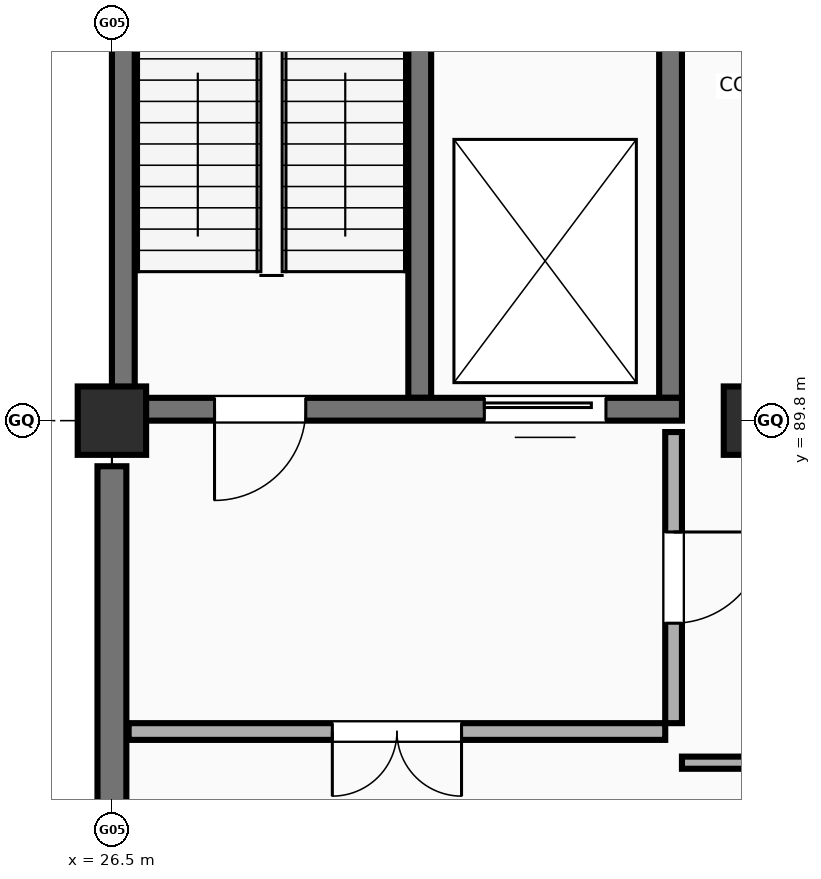
"""IFC4 building model, lengths in metres.
Left out: names, types, materials, properties, quantities, classifications, styles, units other than length and angle.
Written with IfcOpenShell. Run it as: python <this file> out.ifc"""

import sys

from ifc_helpers import new_model, si_unit, direction, frame, frame_2d, origin, origin_2d, place, context, subcontext, project, spatial, rectangle, extrude, element, fill, save


model = new_model("IFC4")
c1 = context("Model", 3, precision=1e-05, world=origin(), true_north=direction((0.0, 1.0)))
c2 = subcontext(c1, "Body", "Model", "MODEL_VIEW")
j1 = project(units=[si_unit("LENGTHUNIT", "METRE"), si_unit("PLANEANGLEUNIT", "RADIAN")], contexts=[c1])
p1 = place(None, origin())
s1 = spatial("IfcSite", under=j1, at=p1, CompositionType="ELEMENT")
p2 = place(p1, origin())
s2 = spatial("IfcBuilding", under=s1, at=p2, CompositionType="ELEMENT")
p3 = place(p2, frame((0.0, 0.0, -4.2)))
s3 = spatial("IfcBuildingStorey", under=s2, at=p3, CompositionType="ELEMENT", Elevation=-4.2)
for number, where, z_axis, x_axis in (
    (1, (26.5, 89.8, -0.42), (0.0, 0.0, 1.0), (1.0, 0.0, 0.0)),
    (2, (35.0, 89.8, -0.42), (0.0, 0.0, 1.0), (1.0, 0.0, 0.0)),
):
    element("IfcColumn", number, at=place(p3, frame(where, z_axis=z_axis, x_axis=x_axis)), inside=s3, PredefinedType="COLUMN", context=c2, shape_type="SweptSolid", body=[
        extrude(rectangle(XDim=0.9, YDim=0.9, at=origin_2d()), origin(), (0.0, 0.0, 1.0), 4.62),
    ])
for number, where, z_axis, x_axis in (
    (3, (26.65, 90.1, -0.42), (0.0, 0.0, 1.0), (0.0, 1.0, 0.0)),
    (4, (33.85, 90.1, -0.42), (0.0, 0.0, 1.0), (0.0, 1.0, 0.0)),
    (5, (30.55, 90.1, -0.42), (0.0, 0.0, 1.0), (0.0, 1.0, 0.0)),
):
    element("IfcWall", number, at=place(p3, frame(where, z_axis=z_axis, x_axis=x_axis)), inside=s3, PredefinedType="SHEAR", context=c2, shape_type="SweptSolid", body=[
        extrude(rectangle(XDim=8.2, YDim=0.3, at=frame_2d((4.1, 0.0))), origin(), (0.0, 0.0, 1.0), 4.62),
    ])
p4 = place(p3, frame((26.5, 73.25, -0.42), z_axis=(0.0, 0.0, 1.0), x_axis=(0.0, 1.0, 0.0)))
e6 = element("IfcWall", 6, at=p4, inside=s3, PredefinedType="SHEAR", context=c2, shape_type="SweptSolid", body=[
    extrude(rectangle(XDim=15.95, YDim=0.38, at=frame_2d((7.975, 0.0))), origin(), (0.0, 0.0, 1.0), 4.3),
])
p5 = place(p3, frame((26.5, 89.95, 0.0), z_axis=(0.0, 0.0, 1.0), x_axis=(1.0, 0.0, 0.0)))
e7 = element("IfcWall", 7, at=p5, inside=s3, PredefinedType="SHEAR", context=c2, shape_type="SweptSolid", body=[
    extrude(rectangle(XDim=7.5, YDim=0.3, at=frame_2d((3.75, 0.0))), origin(), (0.0, 0.0, 1.0), 4.2),
])
p6 = place(p5, frame((2.55, 0.0, 0.0), z_axis=(0.0, 0.0, 1.0), x_axis=(-1.0, 0.0, 0.0)))
e8 = element("IfcOpeningElement", 8, at=p6, cuts=e7, PredefinedType="OPENING", context=c2, shape_type="SweptSolid", body=[
    extrude(rectangle(XDim=1.2, YDim=2.15, at=frame_2d((0.6, 1.075))), frame((0.0, 0.16, 0.0), z_axis=(0.0, -1.0, 0.0), x_axis=(1.0, 0.0, 0.0)), (0.0, 0.0, 1.0), 0.32),
])
p7 = place(p5, frame((4.9, 0.0, 0.0)))
e9 = element("IfcOpeningElement", 9, at=p7, cuts=e7, PredefinedType="OPENING", context=c2, shape_type="SweptSolid", body=[
    extrude(rectangle(XDim=1.6, YDim=2.25, at=frame_2d((0.8, 1.125))), frame((0.0, 0.16, 0.0), z_axis=(0.0, -1.0, 0.0), x_axis=(1.0, 0.0, 0.0)), (0.0, 0.0, 1.0), 0.32),
])
p8 = place(p3, frame((26.72, 85.71, 0.0), z_axis=(0.0, 0.0, 1.0), x_axis=(1.0, 0.0, 0.0)))
e10 = element("IfcWall", 10, at=p8, inside=s3, PredefinedType="SOLIDWALL", context=c2, shape_type="SweptSolid", body=[
    extrude(rectangle(XDim=7.06, YDim=0.22, at=frame_2d((3.53, 0.0))), origin(), (0.0, 0.0, 1.0), 2.96),
])
p9 = place(p8, frame((4.38, 0.0, 0.0), z_axis=(0.0, 0.0, 1.0), x_axis=(-1.0, 0.0, 0.0)))
e11 = element("IfcOpeningElement", 11, at=p9, cuts=e10, PredefinedType="OPENING", context=c2, shape_type="SweptSolid", body=[
    extrude(rectangle(XDim=1.7, YDim=2.18, at=frame_2d((0.85, 1.09))), frame((0.0, 0.12, 0.0), z_axis=(0.0, -1.0, 0.0), x_axis=(1.0, 0.0, 0.0)), (0.0, 0.0, 1.0), 0.24),
])
p10 = place(p3, frame((33.89, 85.82, 0.0), z_axis=(0.0, 0.0, 1.0), x_axis=(0.0, 1.0, 0.0)))
e12 = element("IfcWall", 12, at=p10, inside=s3, PredefinedType="SOLIDWALL", context=c2, shape_type="SweptSolid", body=[
    extrude(rectangle(XDim=3.83, YDim=0.22, at=frame_2d((1.915, 0.0))), origin(), (0.0, 0.0, 1.0), 2.96),
])
p11 = place(p10, frame((2.515, 0.0, 0.0), z_axis=(0.0, 0.0, 1.0), x_axis=(-1.0, 0.0, 0.0)))
e13 = element("IfcOpeningElement", 13, at=p11, cuts=e12, PredefinedType="OPENING", context=c2, shape_type="SweptSolid", body=[
    extrude(rectangle(XDim=1.2, YDim=2.15, at=frame_2d((0.6, 1.075))), frame((0.0, 0.12, 0.0), z_axis=(0.0, -1.0, 0.0), x_axis=(1.0, 0.0, 0.0)), (0.0, 0.0, 1.0), 0.24),
])
p12 = place(p3, frame((34.0, 85.3, 0.0), z_axis=(0.0, 0.0, 1.0), x_axis=(1.0, 0.0, 0.0)))
e14 = element("IfcWall", 14, at=p12, inside=s3, PredefinedType="PARTITIONING", context=c2, shape_type="SweptSolid", body=[
    extrude(rectangle(XDim=31.495, YDim=0.16, at=frame_2d((15.748, 0.0))), origin(), (0.0, 0.0, 1.0), 2.96),
])
p13 = place(p12, frame((14.4, 0.0, 0.0)))
e15 = element("IfcOpeningElement", 15, at=p13, cuts=e14, PredefinedType="OPENING", context=c2, shape_type="SweptSolid", body=[
    extrude(rectangle(XDim=2.4, YDim=2.6, at=frame_2d((1.2, 1.3))), frame((0.0, 0.09, 0.0), z_axis=(0.0, -1.0, 0.0), x_axis=(1.0, 0.0, 0.0)), (0.0, 0.0, 1.0), 0.18),
])
p14 = place(p6, origin())
e16 = element("IfcDoor", 16, at=p14, inside=s3, OperationType="SINGLE_SWING_RIGHT", PredefinedType="DOOR", context=c2, shape_type="SweptSolid", body=[
    extrude(rectangle(XDim=1.2, YDim=2.15, at=frame_2d((0.6, 1.075))), frame((0.0, 0.025, 0.0), z_axis=(0.0, -1.0, 0.0), x_axis=(1.0, 0.0, 0.0)), (0.0, 0.0, 1.0), 0.05),
])
fill(e8, e16)
p15 = place(p7, origin())
e17 = element("IfcDoor", 17, at=p15, inside=s3, OperationType="SLIDING_TO_LEFT", PredefinedType="DOOR", context=c2, shape_type="SweptSolid", body=[
    extrude(rectangle(XDim=1.6, YDim=2.25, at=frame_2d((0.8, 1.125))), frame((0.0, 0.025, 0.0), z_axis=(0.0, -1.0, 0.0), x_axis=(1.0, 0.0, 0.0)), (0.0, 0.0, 1.0), 0.05),
])
fill(e9, e17)
p16 = place(p9, origin())
e18 = element("IfcDoor", 18, at=p16, inside=s3, OperationType="DOUBLE_DOOR_SINGLE_SWING", PredefinedType="DOOR", context=c2, shape_type="SweptSolid", body=[
    extrude(rectangle(XDim=1.7, YDim=2.18, at=frame_2d((0.85, 1.09))), frame((0.0, 0.025, 0.0), z_axis=(0.0, -1.0, 0.0), x_axis=(1.0, 0.0, 0.0)), (0.0, 0.0, 1.0), 0.05),
])
fill(e11, e18)
p17 = place(p11, origin())
e19 = element("IfcDoor", 19, at=p17, inside=s3, OperationType="SINGLE_SWING_LEFT", PredefinedType="DOOR", context=c2, shape_type="SweptSolid", body=[
    extrude(rectangle(XDim=1.2, YDim=2.15, at=frame_2d((0.6, 1.075))), frame((0.0, 0.025, 0.0), z_axis=(0.0, -1.0, 0.0), x_axis=(1.0, 0.0, 0.0)), (0.0, 0.0, 1.0), 0.05),
])
fill(e13, e19)
save(model, sys.argv[1])
